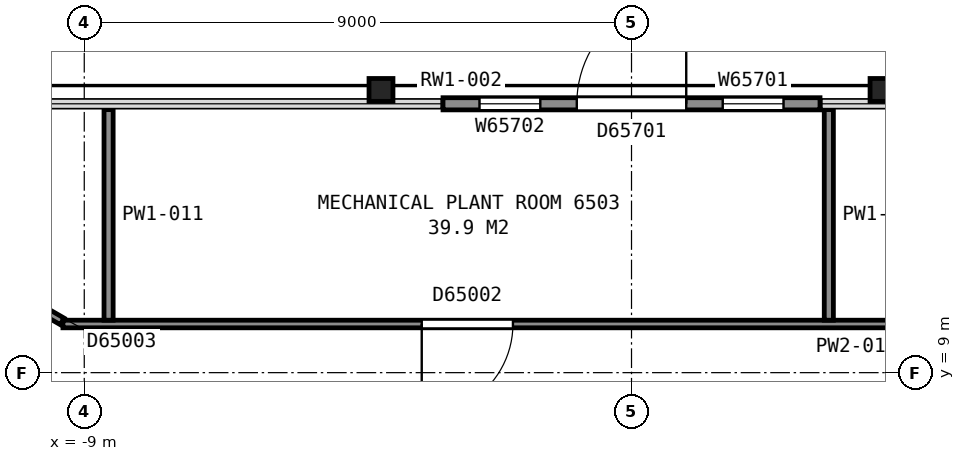
"""IFC4 building model, lengths in metres.
Left out: names, types, materials, properties, quantities, classifications, styles, units other than length and angle.
Written with IfcOpenShell. Run it as: python <this file> out.ifc"""

import sys

from ifc_helpers import new_model, si_unit, direction, frame, frame_2d, origin, origin_2d, place, context, subcontext, project, spatial, rectangle, i_section, extrude, element, fill, save


model = new_model("IFC4")
c1 = context("Model", 3, precision=1e-05, world=origin(), true_north=direction((0.0, 1.0)))
c2 = subcontext(c1, "Body", "Model", "MODEL_VIEW")
j1 = project(units=[si_unit("LENGTHUNIT", "METRE"), si_unit("PLANEANGLEUNIT", "RADIAN")], contexts=[c1])
p1 = place(None, origin())
s1 = spatial("IfcSite", under=j1, at=p1, CompositionType="ELEMENT")
p2 = place(p1, origin())
s2 = spatial("IfcBuilding", under=s1, at=p2, CompositionType="ELEMENT")
p3 = place(p2, frame((0.0, 0.0, 258.2)))
s3 = spatial("IfcBuildingStorey", under=s2, at=p3, CompositionType="ELEMENT", Elevation=258.2)
for number, where, z_axis, x_axis in (
    (1, (4.12, 13.65, -0.16), (0.0, 0.0, 1.0), (1.0, 0.0, 0.0)),
    (2, (-4.12, 13.65, -0.16), (0.0, 0.0, 1.0), (1.0, 0.0, 0.0)),
):
    element("IfcColumn", number, at=place(p3, frame(where, z_axis=z_axis, x_axis=x_axis)), inside=s3, PredefinedType="COLUMN", context=c2, shape_type="SweptSolid", body=[
        extrude(i_section(OverallWidth=0.394, OverallDepth=0.376, WebThickness=0.017, FlangeThickness=0.028, FilletRadius=0.015, at=origin_2d()), origin(), (0.0, 0.0, 1.0), 5.96),
    ])
p4 = place(p3, frame((3.1, 13.422, 0.0), z_axis=(0.0, 0.0, 1.0), x_axis=(-1.0, 0.0, 0.0)))
e3 = element("IfcWall", 3, at=p4, inside=s3, PredefinedType="SOLIDWALL", context=c2, shape_type="SweptSolid", body=[
    extrude(rectangle(XDim=6.2, YDim=0.2, at=frame_2d((3.1, 0.0))), origin(), (0.0, 0.0, 1.0), 4.522),
])
p5 = place(p4, frame((0.6, 0.0, 0.9)))
e4 = element("IfcOpeningElement", 4, at=p5, cuts=e3, PredefinedType="OPENING", context=c2, shape_type="SweptSolid", body=[
    extrude(rectangle(XDim=1.0, YDim=1.5, at=frame_2d((0.5, 0.75))), frame((0.0, 0.11, 0.0), z_axis=(0.0, -1.0, 0.0), x_axis=(1.0, 0.0, 0.0)), (0.0, 0.0, 1.0), 0.22),
])
p6 = place(p4, frame((2.2, 0.0, 0.0)))
e5 = element("IfcOpeningElement", 5, at=p6, cuts=e3, PredefinedType="OPENING", context=c2, shape_type="SweptSolid", body=[
    extrude(rectangle(XDim=1.8, YDim=2.4, at=frame_2d((0.9, 1.2))), frame((0.0, 0.11, 0.0), z_axis=(0.0, -1.0, 0.0), x_axis=(1.0, 0.0, 0.0)), (0.0, 0.0, 1.0), 0.22),
])
p7 = place(p4, frame((4.6, 0.0, 0.9)))
e6 = element("IfcOpeningElement", 6, at=p7, cuts=e3, PredefinedType="OPENING", context=c2, shape_type="SweptSolid", body=[
    extrude(rectangle(XDim=1.0, YDim=1.5, at=frame_2d((0.5, 0.75))), frame((0.0, 0.11, 0.0), z_axis=(0.0, -1.0, 0.0), x_axis=(1.0, 0.0, 0.0)), (0.0, 0.0, 1.0), 0.22),
])
p8 = place(p3, frame((-6.178, 5.299, 0.0), z_axis=(0.0, 0.0, 1.0), x_axis=(-0.866019993635, 0.500009370536, 0.0)))
e7 = element("IfcWall", 7, at=p8, inside=s3, PredefinedType="PARTITIONING", context=c2, shape_type="SweptSolid", body=[
    extrude(rectangle(XDim=9.6, YDim=0.2, at=frame_2d((4.8, 0.0))), origin(), (0.0, 0.0, 1.0), 5.55),
])
p9 = place(p3, frame((-14.07, 12.559, 0.0), z_axis=(0.0, 0.0, 1.0), x_axis=(0.866176613439, -0.49973800569, 0.0)))
e8 = element("IfcWall", 8, at=p9, inside=s3, PredefinedType="PARTITIONING", context=c2, shape_type="SweptSolid", body=[
    extrude(rectangle(XDim=5.436, YDim=0.125, at=frame_2d((2.718, 0.0))), origin(), (0.0, 0.0, 1.0), 4.462),
])
p10 = place(p9, frame((2.0, 0.0, 0.0)))
e9 = element("IfcOpeningElement", 9, at=p10, cuts=e8, PredefinedType="OPENING", context=c2, shape_type="SweptSolid", body=[
    extrude(rectangle(XDim=1.5, YDim=2.1, at=frame_2d((0.75, 1.05))), frame((0.0, 0.073, 0.0), z_axis=(0.0, -1.0, 0.0), x_axis=(1.0, 0.0, 0.0)), (0.0, 0.0, 1.0), 0.145),
])
p11 = place(p3, frame((-9.351, 9.8, 0.0), z_axis=(0.0, 0.0, 1.0), x_axis=(1.0, 0.0, 0.0)))
e10 = element("IfcWall", 10, at=p11, inside=s3, PredefinedType="PARTITIONING", context=c2, shape_type="SweptSolid", body=[
    extrude(rectangle(XDim=18.701, YDim=0.125, at=frame_2d((9.351, 0.0))), origin(), (0.0, 0.0, 1.0), 4.462),
])
p12 = place(p11, frame((5.9, 0.0, 0.0)))
e11 = element("IfcOpeningElement", 11, at=p12, cuts=e10, PredefinedType="OPENING", context=c2, shape_type="SweptSolid", body=[
    extrude(rectangle(XDim=1.5, YDim=2.1, at=frame_2d((0.75, 1.05))), frame((0.0, 0.073, 0.0), z_axis=(0.0, -1.0, 0.0), x_axis=(1.0, 0.0, 0.0)), (0.0, 0.0, 1.0), 0.145),
])
for number, where, z_axis, x_axis in (
    (12, (-8.6, 9.863, 0.0), (0.0, 0.0, 1.0), (0.0, 1.0, 0.0)),
    (13, (3.245, 9.863, 0.0), (0.0, 0.0, 1.0), (0.0, 1.0, 0.0)),
):
    element("IfcWall", number, at=place(p3, frame(where, z_axis=z_axis, x_axis=x_axis)), inside=s3, PredefinedType="PARTITIONING", context=c2, shape_type="SweptSolid", body=[
        extrude(rectangle(XDim=3.463, YDim=0.15, at=frame_2d((1.732, 0.0))), origin(), (0.0, 0.0, 1.0), 4.462),
    ])
p13 = place(p5, origin())
e14 = element("IfcWindow", 14, at=p13, inside=s3, PartitioningType="SINGLE_PANEL", PredefinedType="WINDOW", context=c2, shape_type="SweptSolid", body=[
    extrude(rectangle(XDim=1.0, YDim=1.5, at=frame_2d((0.5, 0.75))), frame((0.0, 0.03, 0.0), z_axis=(0.0, -1.0, 0.0), x_axis=(1.0, 0.0, 0.0)), (0.0, 0.0, 1.0), 0.06),
])
fill(e4, e14)
p14 = place(p6, frame((1.8, 0.0, 0.0), z_axis=(0.0, 0.0, 1.0), x_axis=(-1.0, 0.0, 0.0)))
e15 = element("IfcDoor", 15, at=p14, inside=s3, OperationType="DOUBLE_DOOR_SINGLE_SWING", PredefinedType="DOOR", context=c2, shape_type="SweptSolid", body=[
    extrude(rectangle(XDim=1.8, YDim=2.4, at=frame_2d((0.9, 1.2))), frame((0.0, 0.025, 0.0), z_axis=(0.0, -1.0, 0.0), x_axis=(1.0, 0.0, 0.0)), (0.0, 0.0, 1.0), 0.05),
])
fill(e5, e15)
p15 = place(p7, origin())
e16 = element("IfcWindow", 16, at=p15, inside=s3, PartitioningType="SINGLE_PANEL", PredefinedType="WINDOW", context=c2, shape_type="SweptSolid", body=[
    extrude(rectangle(XDim=1.0, YDim=1.5, at=frame_2d((0.5, 0.75))), frame((0.0, 0.03, 0.0), z_axis=(0.0, -1.0, 0.0), x_axis=(1.0, 0.0, 0.0)), (0.0, 0.0, 1.0), 0.06),
])
fill(e6, e16)
p16 = place(p12, origin())
e17 = element("IfcDoor", 17, at=p16, inside=s3, OperationType="DOUBLE_DOOR_SINGLE_SWING", PredefinedType="DOOR", context=c2, shape_type="SweptSolid", body=[
    extrude(rectangle(XDim=1.5, YDim=2.1, at=frame_2d((0.75, 1.05))), frame((0.0, 0.025, 0.0), z_axis=(0.0, -1.0, 0.0), x_axis=(1.0, 0.0, 0.0)), (0.0, 0.0, 1.0), 0.05),
])
fill(e11, e17)
save(model, sys.argv[1])
